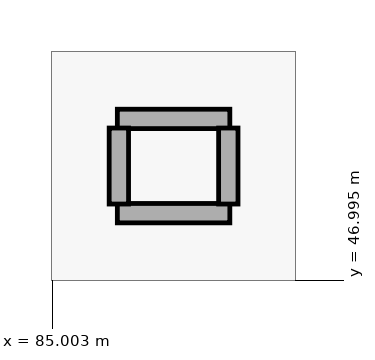
"""IFC4 building model, lengths in metres.
Left out: names, types, materials, properties, quantities, classifications, styles, units other than length and angle.
Written with IfcOpenShell. Run it as: python <this file> out.ifc"""

import sys

from ifc_helpers import new_model, si_unit, direction, frame, frame_2d, origin, place, context, subcontext, project, spatial, rectangle, extrude, element, save


model = new_model("IFC4")
c1 = context("Model", 3, precision=1e-05, world=origin(), true_north=direction((0.0, 1.0)))
c2 = subcontext(c1, "Body", "Model", "MODEL_VIEW")
j1 = project(units=[si_unit("LENGTHUNIT", "METRE"), si_unit("PLANEANGLEUNIT", "RADIAN")], contexts=[c1])
p1 = place(None, origin())
s1 = spatial("IfcSite", under=j1, at=p1, CompositionType="ELEMENT")
p2 = place(p1, origin())
s2 = spatial("IfcBuilding", under=s1, at=p2, CompositionType="ELEMENT")
p3 = place(p2, frame((0.0, 0.0, 10.5)))
s3 = spatial("IfcBuildingStorey", under=s2, at=p3, CompositionType="ELEMENT", Elevation=10.5)
for number, where, z_axis, x_axis in (
    (1, (85.86, 49.12, 0.0), (0.0, 0.0, 1.0), (1.0, 0.0, 0.0)),
    (2, (85.86, 47.88, 0.0), (0.0, 0.0, 1.0), (1.0, 0.0, 0.0)),
):
    element("IfcWall", number, at=place(p3, frame(where, z_axis=z_axis, x_axis=x_axis)), inside=s3, PredefinedType="PARTITIONING", context=c2, shape_type="SweptSolid", body=[
        extrude(rectangle(XDim=1.48, YDim=0.255, at=frame_2d((0.74, 0.0))), origin(), (0.0, 0.0, 1.0), 4.43),
    ])
p4 = place(p3, frame((85.88, 48.0, 0.0), z_axis=(0.0, 0.0, 1.0), x_axis=(0.0, 1.0, 0.0)))
e3 = element("IfcWall", 3, at=p4, inside=s3, PredefinedType="PARTITIONING", context=c2, shape_type="SweptSolid", body=[
    extrude(rectangle(XDim=1.0, YDim=0.255, at=frame_2d((0.5, 0.0))), origin(), (0.0, 0.0, 1.0), 4.43),
])
p5 = place(p3, frame((87.32, 48.0, 0.0), z_axis=(0.0, 0.0, 1.0), x_axis=(0.0, 1.0, 0.0)))
e4 = element("IfcWall", 4, at=p5, inside=s3, PredefinedType="PARTITIONING", context=c2, shape_type="SweptSolid", body=[
    extrude(rectangle(XDim=1.0, YDim=0.255, at=frame_2d((0.5, 0.0))), origin(), (0.0, 0.0, 1.0), 4.72),
])
save(model, sys.argv[1])
